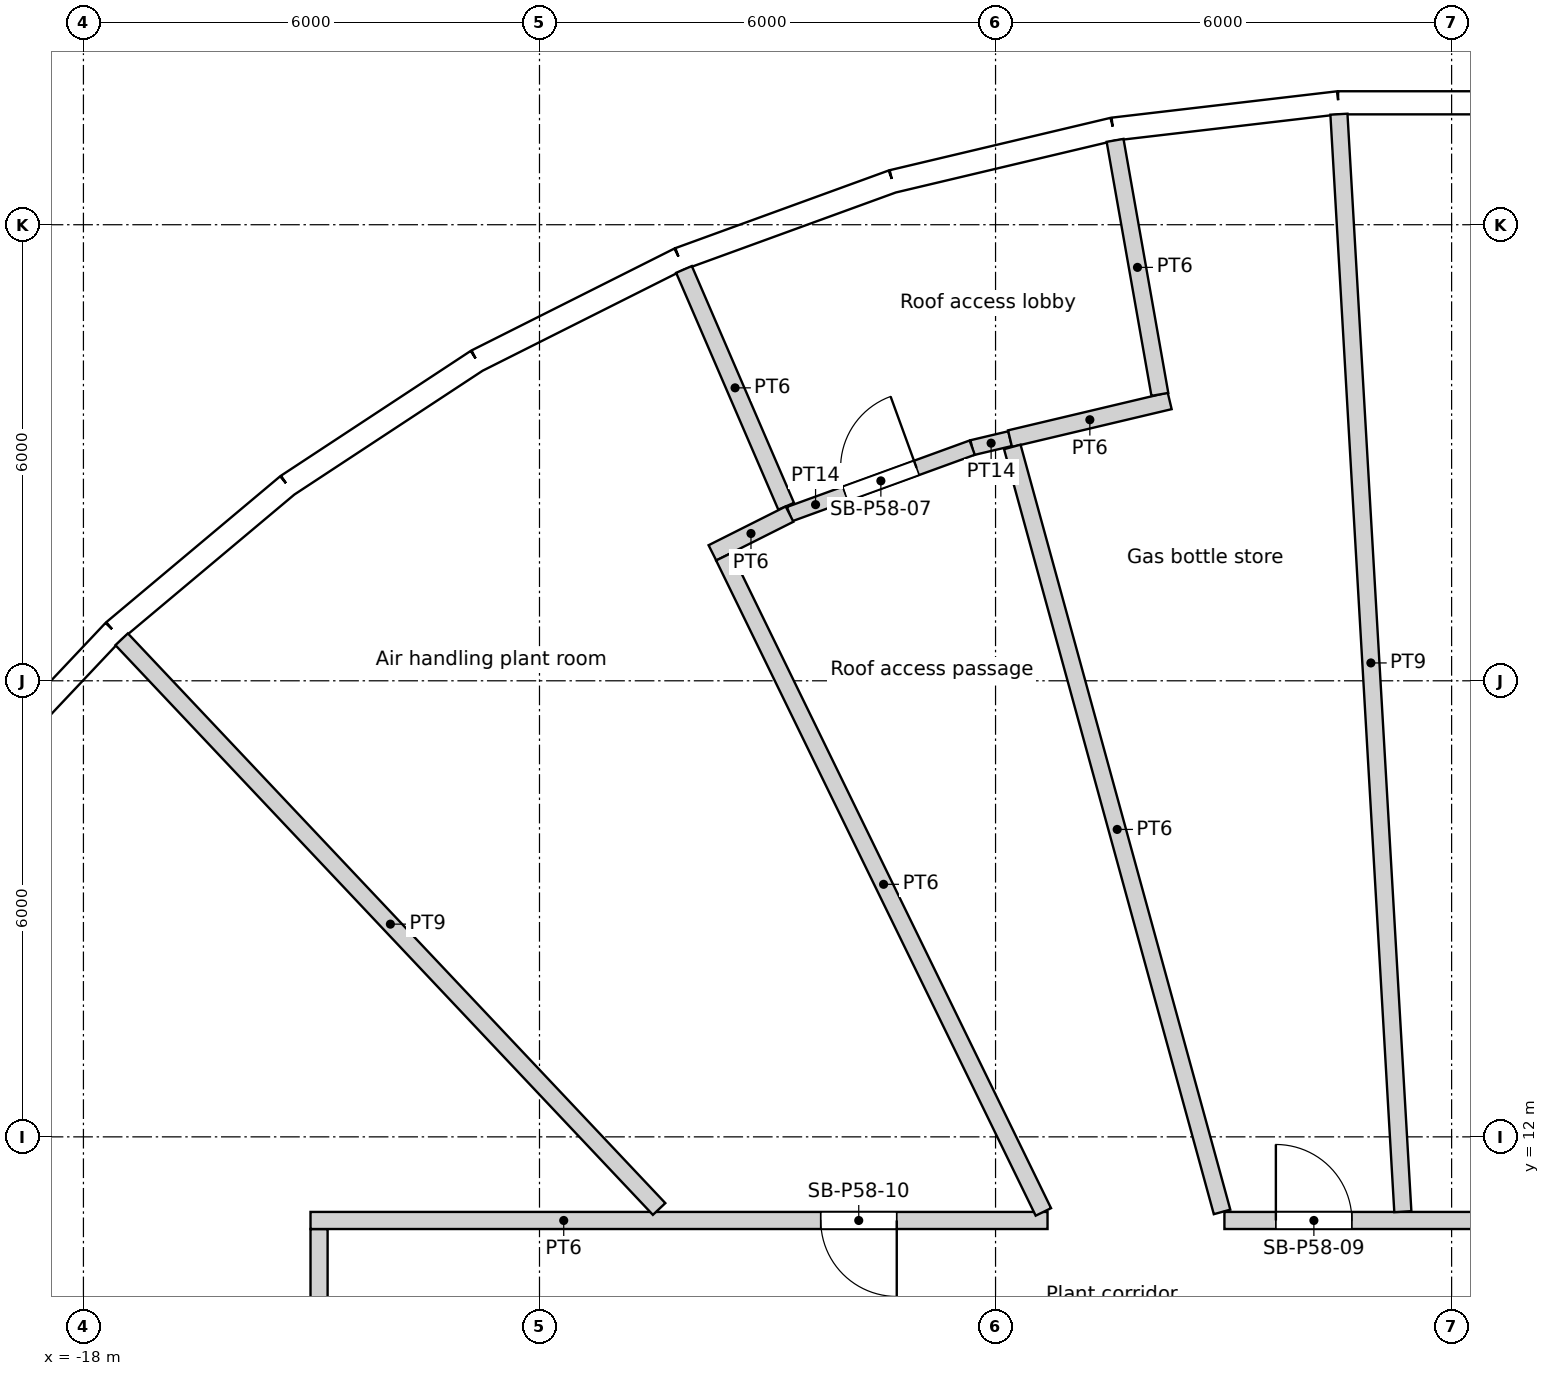
"""IFC4 building model, lengths in metres.
Left out: names, types, materials, properties, quantities, classifications, styles, units other than length and angle.
Written with IfcOpenShell. Run it as: python <this file> out.ifc"""

import sys

from ifc_helpers import new_model, si_unit, direction, frame, frame_2d, origin, origin_2d, place, context, subcontext, project, spatial, rectangle, circle, extrude, element, fill, save


model = new_model("IFC4")
c1 = context("Model", 3, precision=1e-05, world=origin(), true_north=direction((0.0, 1.0)))
c2 = subcontext(c1, "Body", "Model", "MODEL_VIEW")
j1 = project(units=[si_unit("LENGTHUNIT", "METRE"), si_unit("PLANEANGLEUNIT", "RADIAN")], contexts=[c1])
p1 = place(None, origin())
s1 = spatial("IfcSite", under=j1, at=p1, CompositionType="ELEMENT")
p2 = place(p1, origin())
s2 = spatial("IfcBuilding", under=s1, at=p2, CompositionType="ELEMENT")
p3 = place(p2, frame((0.0, 0.0, 225.0)))
s3 = spatial("IfcBuildingStorey", under=s2, at=p3, CompositionType="ELEMENT", Elevation=225.0)
for number, where, z_axis, x_axis in (
    (1, (-1.427, 24.506, 0.0), (0.0, 0.0, 1.0), (1.0, 0.0, 0.0)),
    (2, (-7.04, 23.516, 0.0), (0.0, 0.0, 1.0), (1.0, 0.0, 0.0)),
    (3, (-12.274, 21.259, 0.0), (0.0, 0.0, 1.0), (1.0, 0.0, 0.0)),
    (4, (-16.846, 17.855, 0.0), (0.0, 0.0, 1.0), (1.0, 0.0, 0.0)),
):
    element("IfcColumn", number, at=place(p3, frame(where, z_axis=z_axis, x_axis=x_axis)), inside=s3, PredefinedType="COLUMN", context=c2, shape_type="SweptSolid", body=[
        extrude(circle(Radius=0.6, at=origin_2d()), origin(), (0.0, 0.0, 1.0), 6.0),
    ])
for number, where, z_axis, x_axis in (
    (5, (-4.188, 18.35, 0.0), (0.0, 0.0, 1.0), (1.0, 0.0, 0.0)),
    (6, (-9.411, 16.301, 0.0), (0.0, 0.0, 1.0), (1.0, 0.0, 0.0)),
    (7, (-13.798, 12.802, 0.0), (0.0, 0.0, 1.0), (1.0, 0.0, 0.0)),
):
    element("IfcColumn", number, at=place(p3, frame(where, z_axis=z_axis, x_axis=x_axis)), inside=s3, PredefinedType="COLUMN", context=c2, shape_type="SweptSolid", body=[
        extrude(circle(Radius=0.65, at=origin_2d()), origin(), (0.0, 0.0, 1.0), 6.0),
    ])
p4 = place(p3, frame((1.491, 25.604, 0.0), z_axis=(0.0, 0.0, 1.0), x_axis=(-1.0, 0.0, 0.0)))
e8 = element("IfcWall", 8, at=p4, inside=s3, PredefinedType="SOLIDWALL", context=c2, shape_type="SweptSolid", body=[
    extrude(rectangle(XDim=2.982, YDim=0.3, at=frame_2d((1.491, 0.0))), origin(), (0.0, 0.0, 1.0), 5.65),
])
p5 = place(p4, frame((1.491, 0.0, 1.825)))
e9 = element("IfcOpeningElement", 9, at=p5, cuts=e8, PredefinedType="OPENING", context=c2, shape_type="SweptSolid", body=[
    extrude(circle(Radius=1.2, at=origin_2d()), frame((0.0, 0.16, 0.0), z_axis=(0.0, -1.0, 0.0), x_axis=(1.0, 0.0, 0.0)), (0.0, 0.0, 1.0), 0.32),
])
p6 = place(p3, frame((-1.491, 25.604, 0.0), z_axis=(0.0, 0.0, 1.0), x_axis=(-0.993240822844, -0.116071821888, 0.0)))
e10 = element("IfcWall", 10, at=p6, inside=s3, PredefinedType="SOLIDWALL", context=c2, shape_type="SweptSolid", body=[
    extrude(rectangle(XDim=2.983, YDim=0.3, at=frame_2d((1.491, 0.0))), origin(), (0.0, 0.0, 1.0), 5.65),
])
p7 = place(p6, frame((1.491, 0.0, 1.825)))
e11 = element("IfcOpeningElement", 11, at=p7, cuts=e10, PredefinedType="OPENING", context=c2, shape_type="SweptSolid", body=[
    extrude(circle(Radius=1.2, at=origin_2d()), frame((0.0, 0.16, 0.0), z_axis=(0.0, -1.0, 0.0), x_axis=(1.0, 0.0, 0.0)), (0.0, 0.0, 1.0), 0.32),
])
p8 = place(p3, frame((-4.454, 25.258, 0.0), z_axis=(0.0, 0.0, 1.0), x_axis=(-0.973049843813, -0.230594886012, 0.0)))
e12 = element("IfcWall", 12, at=p8, inside=s3, PredefinedType="SOLIDWALL", context=c2, shape_type="SweptSolid", body=[
    extrude(rectangle(XDim=2.982, YDim=0.3, at=frame_2d((1.491, 0.0))), origin(), (0.0, 0.0, 1.0), 5.65),
])
p9 = place(p8, frame((1.491, 0.0, 1.825)))
e13 = element("IfcOpeningElement", 13, at=p9, cuts=e12, PredefinedType="OPENING", context=c2, shape_type="SweptSolid", body=[
    extrude(circle(Radius=1.2, at=origin_2d()), frame((0.0, 0.16, 0.0), z_axis=(0.0, -1.0, 0.0), x_axis=(1.0, 0.0, 0.0)), (0.0, 0.0, 1.0), 0.32),
])
p10 = place(p3, frame((-7.356, 24.57, 0.0), z_axis=(0.0, 0.0, 1.0), x_axis=(-0.939676264274, -0.342065079129, 0.0)))
e14 = element("IfcWall", 14, at=p10, inside=s3, PredefinedType="SOLIDWALL", context=c2, shape_type="SweptSolid", body=[
    extrude(rectangle(XDim=2.983, YDim=0.3, at=frame_2d((1.491, 0.0))), origin(), (0.0, 0.0, 1.0), 5.65),
])
p11 = place(p10, frame((1.491, 0.0, 1.825)))
e15 = element("IfcOpeningElement", 15, at=p11, cuts=e14, PredefinedType="OPENING", context=c2, shape_type="SweptSolid", body=[
    extrude(circle(Radius=1.2, at=origin_2d()), frame((0.0, 0.16, 0.0), z_axis=(0.0, -1.0, 0.0), x_axis=(1.0, 0.0, 0.0)), (0.0, 0.0, 1.0), 0.32),
])
p12 = place(p3, frame((-10.158, 23.55, 0.0), z_axis=(0.0, 0.0, 1.0), x_axis=(-0.893656390984, -0.448751885626, 0.0)))
e16 = element("IfcWall", 16, at=p12, inside=s3, PredefinedType="SOLIDWALL", context=c2, shape_type="SweptSolid", body=[
    extrude(rectangle(XDim=2.982, YDim=0.3, at=frame_2d((1.491, 0.0))), origin(), (0.0, 0.0, 1.0), 5.65),
])
p13 = place(p12, frame((1.491, 0.0, 1.825)))
e17 = element("IfcOpeningElement", 17, at=p13, cuts=e16, PredefinedType="OPENING", context=c2, shape_type="SweptSolid", body=[
    extrude(circle(Radius=1.2, at=origin_2d()), frame((0.0, 0.16, 0.0), z_axis=(0.0, -1.0, 0.0), x_axis=(1.0, 0.0, 0.0)), (0.0, 0.0, 1.0), 0.32),
])
p14 = place(p3, frame((-12.824, 22.211, 0.0), z_axis=(0.0, 0.0, 1.0), x_axis=(-0.835497187922, -0.549494721517, 0.0)))
e18 = element("IfcWall", 18, at=p14, inside=s3, PredefinedType="SOLIDWALL", context=c2, shape_type="SweptSolid", body=[
    extrude(rectangle(XDim=2.983, YDim=0.3, at=frame_2d((1.491, 0.0))), origin(), (0.0, 0.0, 1.0), 5.65),
])
p15 = place(p14, frame((1.491, 0.0, 1.825)))
e19 = element("IfcOpeningElement", 19, at=p15, cuts=e18, PredefinedType="OPENING", context=c2, shape_type="SweptSolid", body=[
    extrude(circle(Radius=1.2, at=origin_2d()), frame((0.0, 0.16, 0.0), z_axis=(0.0, -1.0, 0.0), x_axis=(1.0, 0.0, 0.0)), (0.0, 0.0, 1.0), 0.32),
])
p16 = place(p3, frame((-15.316, 20.573, 0.0), z_axis=(0.0, 0.0, 1.0), x_axis=(-0.766015999952, -0.64282150541, 0.0)))
e20 = element("IfcWall", 20, at=p16, inside=s3, PredefinedType="SOLIDWALL", context=c2, shape_type="SweptSolid", body=[
    extrude(rectangle(XDim=2.982, YDim=0.3, at=frame_2d((1.491, 0.0))), origin(), (0.0, 0.0, 1.0), 5.65),
])
p17 = place(p16, frame((1.491, 0.0, 1.825)))
e21 = element("IfcOpeningElement", 21, at=p17, cuts=e20, PredefinedType="OPENING", context=c2, shape_type="SweptSolid", body=[
    extrude(circle(Radius=1.2, at=origin_2d()), frame((0.0, 0.16, 0.0), z_axis=(0.0, -1.0, 0.0), x_axis=(1.0, 0.0, 0.0)), (0.0, 0.0, 1.0), 0.32),
])
p18 = place(p3, frame((-17.6, 18.655, 0.0), z_axis=(0.0, 0.0, 1.0), x_axis=(-0.686219609698, -0.72739442345, 0.0)))
e22 = element("IfcWall", 22, at=p18, inside=s3, PredefinedType="SOLIDWALL", context=c2, shape_type="SweptSolid", body=[
    extrude(rectangle(XDim=2.982, YDim=0.3, at=frame_2d((1.491, 0.0))), origin(), (0.0, 0.0, 1.0), 5.65),
])
p19 = place(p18, frame((1.491, 0.0, 1.825)))
e23 = element("IfcOpeningElement", 23, at=p19, cuts=e22, PredefinedType="OPENING", context=c2, shape_type="SweptSolid", body=[
    extrude(circle(Radius=1.2, at=origin_2d()), frame((0.0, 0.16, 0.0), z_axis=(0.0, -1.0, 0.0), x_axis=(1.0, 0.0, 0.0)), (0.0, 0.0, 1.0), 0.32),
])
p20 = place(p3, frame((-17.497, 18.546, 0.0), z_axis=(0.0, 0.0, 1.0), x_axis=(0.686241478279, -0.727373792138, 0.0)))
e24 = element("IfcWall", 24, at=p20, inside=s3, PredefinedType="PARTITIONING", context=c2, shape_type="SweptSolid", body=[
    extrude(rectangle(XDim=10.304, YDim=0.225, at=frame_2d((5.152, 0.0))), origin(), (0.0, 0.0, 1.0), 2.7),
])
p21 = place(p3, frame((-14.9, 10.788, 0.0), z_axis=(0.0, 0.0, 1.0), x_axis=(0.0, -1.0, 0.0)))
e25 = element("IfcWall", 25, at=p21, inside=s3, PredefinedType="PARTITIONING", context=c2, shape_type="SweptSolid", body=[
    extrude(rectangle(XDim=21.8, YDim=0.225, at=frame_2d((10.9, 0.0))), origin(), (0.0, 0.0, 1.0), 5.2),
])
p22 = place(p21, frame((5.708, 0.0, 0.0)))
e26 = element("IfcOpeningElement", 26, at=p22, cuts=e25, PredefinedType="OPENING", context=c2, shape_type="SweptSolid", body=[
    extrude(rectangle(XDim=1.0, YDim=2.1, at=frame_2d((0.5, 1.05))), frame((0.0, 0.113, 0.0), z_axis=(0.0, -1.0, 0.0), x_axis=(1.0, 0.0, 0.0)), (0.0, 0.0, 1.0), 0.225),
])
p23 = place(p21, frame((16.608, 0.0, 0.0)))
e27 = element("IfcOpeningElement", 27, at=p23, cuts=e25, PredefinedType="OPENING", context=c2, shape_type="SweptSolid", body=[
    extrude(rectangle(XDim=1.0, YDim=2.1, at=frame_2d((0.5, 1.05))), frame((0.0, 0.113, 0.0), z_axis=(0.0, -1.0, 0.0), x_axis=(1.0, 0.0, 0.0)), (0.0, 0.0, 1.0), 0.225),
])
p24 = place(p3, frame((-10.099, 23.412, 0.0), z_axis=(0.0, 0.0, 1.0), x_axis=(0.396080406485, -0.918215830619, 0.0)))
e28 = element("IfcWall", 28, at=p24, inside=s3, PredefinedType="PARTITIONING", context=c2, shape_type="SweptSolid", body=[
    extrude(rectangle(XDim=3.393, YDim=0.225, at=frame_2d((1.697, 0.0))), origin(), (0.0, 0.0, 1.0), 5.2),
])
p25 = place(p3, frame((-9.575, 19.633, 0.0), z_axis=(0.0, 0.0, 1.0), x_axis=(0.438353415496, -0.898802694212, 0.0)))
e29 = element("IfcWall", 29, at=p25, inside=s3, PredefinedType="PARTITIONING", context=c2, shape_type="SweptSolid", body=[
    extrude(rectangle(XDim=9.591, YDim=0.225, at=frame_2d((4.795, 0.0))), origin(), (0.0, 0.0, 1.0), 5.2),
])
p26 = place(p3, frame((-8.71, 20.193, 0.0), z_axis=(0.0, 0.0, 1.0), x_axis=(-0.893651754286, -0.448761119152, 0.0)))
e30 = element("IfcWall", 30, at=p26, inside=s3, PredefinedType="PARTITIONING", context=c2, shape_type="SweptSolid", body=[
    extrude(rectangle(XDim=1.135, YDim=0.225, at=frame_2d((0.568, 0.0))), origin(), (0.0, 0.0, 1.0), 5.2),
])
p27 = place(p3, frame((-8.71, 20.193, 0.0), z_axis=(0.0, 0.0, 1.0), x_axis=(0.939679089592, 0.342057317688, 0.0)))
e31 = element("IfcWall", 31, at=p27, inside=s3, PredefinedType="PARTITIONING", context=c2, shape_type="SweptSolid", body=[
    extrude(rectangle(XDim=2.557, YDim=0.2, at=frame_2d((1.279, 0.0))), origin(), (0.0, 0.0, 1.0), 5.2),
])
p28 = place(p27, frame((0.779, 0.0, 0.0)))
e32 = element("IfcOpeningElement", 32, at=p28, cuts=e31, PredefinedType="OPENING", context=c2, shape_type="SweptSolid", body=[
    extrude(rectangle(XDim=1.0, YDim=2.1, at=frame_2d((0.5, 1.05))), frame((0.0, 0.1, 0.0), z_axis=(0.0, -1.0, 0.0), x_axis=(1.0, 0.0, 0.0)), (0.0, 0.0, 1.0), 0.2),
])
p29 = place(p3, frame((-5.81, 21.185, 0.0), z_axis=(0.0, 0.0, 1.0), x_axis=(-0.973046464048, -0.230609147269, 0.0)))
e33 = element("IfcWall", 33, at=p29, inside=s3, PredefinedType="PARTITIONING", context=c2, shape_type="SweptSolid", body=[
    extrude(rectangle(XDim=0.511, YDim=0.2, at=frame_2d((0.256, 0.0))), origin(), (0.0, 0.0, 1.0), 5.2),
])
p30 = place(p3, frame((-5.78, 21.077, 0.0), z_axis=(0.0, 0.0, 1.0), x_axis=(0.264447382595, -0.964400115014, 0.0)))
e34 = element("IfcWall", 34, at=p30, inside=s3, PredefinedType="PARTITIONING", context=c2, shape_type="SweptSolid", body=[
    extrude(rectangle(XDim=10.436, YDim=0.225, at=frame_2d((5.218, 0.0))), origin(), (0.0, 0.0, 1.0), 5.2),
])
p31 = place(p3, frame((-5.316, 10.9, 0.0), z_axis=(0.0, 0.0, 1.0), x_axis=(-1.0, 0.0, 0.0)))
e35 = element("IfcWall", 35, at=p31, inside=s3, PredefinedType="PARTITIONING", context=c2, shape_type="SweptSolid", body=[
    extrude(rectangle(XDim=9.696, YDim=0.225, at=frame_2d((4.848, 0.0))), origin(), (0.0, 0.0, 1.0), 5.2),
])
p32 = place(p31, frame((1.984, 0.0, 0.0)))
e36 = element("IfcOpeningElement", 36, at=p32, cuts=e35, PredefinedType="OPENING", context=c2, shape_type="SweptSolid", body=[
    extrude(rectangle(XDim=1.0, YDim=2.1, at=frame_2d((0.5, 1.05))), frame((0.0, 0.113, 0.0), z_axis=(0.0, -1.0, 0.0), x_axis=(1.0, 0.0, 0.0)), (0.0, 0.0, 1.0), 0.225),
])
p33 = place(p3, frame((-4.427, 25.11, 0.0), z_axis=(0.0, 0.0, 1.0), x_axis=(0.173678620436, -0.984802384645, 0.0)))
e37 = element("IfcWall", 37, at=p33, inside=s3, PredefinedType="PARTITIONING", context=c2, shape_type="SweptSolid", body=[
    extrude(rectangle(XDim=3.393, YDim=0.225, at=frame_2d((1.697, 0.0))), origin(), (0.0, 0.0, 1.0), 5.2),
])
p34 = place(p3, frame((-3.709, 21.683, 0.0), z_axis=(0.0, 0.0, 1.0), x_axis=(-0.973043562326, -0.230621390629, 0.0)))
e38 = element("IfcWall", 38, at=p34, inside=s3, PredefinedType="PARTITIONING", context=c2, shape_type="SweptSolid", body=[
    extrude(rectangle(XDim=2.158, YDim=0.225, at=frame_2d((1.079, 0.0))), origin(), (0.0, 0.0, 1.0), 5.2),
])
p35 = place(p3, frame((-1.482, 25.454, 0.0), z_axis=(0.0, 0.0, 1.0), x_axis=(0.058137182414, -0.9983086036, 0.0)))
e39 = element("IfcWall", 39, at=p35, inside=s3, PredefinedType="PARTITIONING", context=c2, shape_type="SweptSolid", body=[
    extrude(rectangle(XDim=14.463, YDim=0.225, at=frame_2d((7.231, 0.0))), origin(), (0.0, 0.0, 1.0), 2.7),
])
p36 = place(p3, frame((13.239, 10.9, 0.0), z_axis=(0.0, 0.0, 1.0), x_axis=(-1.0, 0.0, 0.0)))
e40 = element("IfcWall", 40, at=p36, inside=s3, PredefinedType="PARTITIONING", context=c2, shape_type="SweptSolid", body=[
    extrude(rectangle(XDim=16.228, YDim=0.225, at=frame_2d((8.114, 0.0))), origin(), (0.0, 0.0, 1.0), 5.2),
])
p37 = place(p36, frame((3.738, 0.0, 0.0)))
e41 = element("IfcOpeningElement", 41, at=p37, cuts=e40, PredefinedType="OPENING", context=c2, shape_type="SweptSolid", body=[
    extrude(rectangle(XDim=1.8, YDim=2.4, at=frame_2d((0.9, 1.2))), frame((0.0, 0.113, 0.0), z_axis=(0.0, -1.0, 0.0), x_axis=(1.0, 0.0, 0.0)), (0.0, 0.0, 1.0), 0.225),
])
p38 = place(p36, frame((10.706, 0.0, 0.0)))
e42 = element("IfcOpeningElement", 42, at=p38, cuts=e40, PredefinedType="OPENING", context=c2, shape_type="SweptSolid", body=[
    extrude(rectangle(XDim=1.0, YDim=2.1, at=frame_2d((0.5, 1.05))), frame((0.0, 0.113, 0.0), z_axis=(0.0, -1.0, 0.0), x_axis=(1.0, 0.0, 0.0)), (0.0, 0.0, 1.0), 0.225),
])
p39 = place(p36, frame((14.551, 0.0, 0.0)))
e43 = element("IfcOpeningElement", 43, at=p39, cuts=e40, PredefinedType="OPENING", context=c2, shape_type="SweptSolid", body=[
    extrude(rectangle(XDim=1.0, YDim=2.1, at=frame_2d((0.5, 1.05))), frame((0.0, 0.113, 0.0), z_axis=(0.0, -1.0, 0.0), x_axis=(1.0, 0.0, 0.0)), (0.0, 0.0, 1.0), 0.225),
])
p40 = place(p5, origin())
e44 = element("IfcWindow", 44, at=p40, inside=s3, PartitioningType="SINGLE_PANEL", PredefinedType="WINDOW", context=c2, shape_type="SweptSolid", body=[
    extrude(circle(Radius=1.2, at=origin_2d()), frame((0.0, 0.12, 0.0), z_axis=(0.0, -1.0, 0.0), x_axis=(1.0, 0.0, 0.0)), (0.0, 0.0, 1.0), 0.1),
])
fill(e9, e44)
p41 = place(p7, origin())
e45 = element("IfcWindow", 45, at=p41, inside=s3, PartitioningType="SINGLE_PANEL", PredefinedType="WINDOW", context=c2, shape_type="SweptSolid", body=[
    extrude(circle(Radius=1.2, at=origin_2d()), frame((0.0, 0.12, 0.0), z_axis=(0.0, -1.0, 0.0), x_axis=(1.0, 0.0, 0.0)), (0.0, 0.0, 1.0), 0.1),
])
fill(e11, e45)
p42 = place(p9, origin())
e46 = element("IfcWindow", 46, at=p42, inside=s3, PartitioningType="SINGLE_PANEL", PredefinedType="WINDOW", context=c2, shape_type="SweptSolid", body=[
    extrude(circle(Radius=1.2, at=origin_2d()), frame((0.0, 0.12, 0.0), z_axis=(0.0, -1.0, 0.0), x_axis=(1.0, 0.0, 0.0)), (0.0, 0.0, 1.0), 0.1),
])
fill(e13, e46)
p43 = place(p11, origin())
e47 = element("IfcWindow", 47, at=p43, inside=s3, PartitioningType="SINGLE_PANEL", PredefinedType="WINDOW", context=c2, shape_type="SweptSolid", body=[
    extrude(circle(Radius=1.2, at=origin_2d()), frame((0.0, 0.12, 0.0), z_axis=(0.0, -1.0, 0.0), x_axis=(1.0, 0.0, 0.0)), (0.0, 0.0, 1.0), 0.1),
])
fill(e15, e47)
p44 = place(p13, origin())
e48 = element("IfcWindow", 48, at=p44, inside=s3, PartitioningType="SINGLE_PANEL", PredefinedType="WINDOW", context=c2, shape_type="SweptSolid", body=[
    extrude(circle(Radius=1.2, at=origin_2d()), frame((0.0, 0.12, 0.0), z_axis=(0.0, -1.0, 0.0), x_axis=(1.0, 0.0, 0.0)), (0.0, 0.0, 1.0), 0.1),
])
fill(e17, e48)
p45 = place(p15, origin())
e49 = element("IfcWindow", 49, at=p45, inside=s3, PartitioningType="SINGLE_PANEL", PredefinedType="WINDOW", context=c2, shape_type="SweptSolid", body=[
    extrude(circle(Radius=1.2, at=origin_2d()), frame((0.0, 0.12, 0.0), z_axis=(0.0, -1.0, 0.0), x_axis=(1.0, 0.0, 0.0)), (0.0, 0.0, 1.0), 0.1),
])
fill(e19, e49)
p46 = place(p17, origin())
e50 = element("IfcWindow", 50, at=p46, inside=s3, PartitioningType="SINGLE_PANEL", PredefinedType="WINDOW", context=c2, shape_type="SweptSolid", body=[
    extrude(circle(Radius=1.2, at=origin_2d()), frame((0.0, 0.12, 0.0), z_axis=(0.0, -1.0, 0.0), x_axis=(1.0, 0.0, 0.0)), (0.0, 0.0, 1.0), 0.1),
])
fill(e21, e50)
p47 = place(p19, origin())
e51 = element("IfcWindow", 51, at=p47, inside=s3, PartitioningType="SINGLE_PANEL", PredefinedType="WINDOW", context=c2, shape_type="SweptSolid", body=[
    extrude(circle(Radius=1.2, at=origin_2d()), frame((0.0, 0.12, 0.0), z_axis=(0.0, -1.0, 0.0), x_axis=(1.0, 0.0, 0.0)), (0.0, 0.0, 1.0), 0.1),
])
fill(e23, e51)
p48 = place(p28, origin())
e52 = element("IfcDoor", 52, at=p48, inside=s3, OperationType="SINGLE_SWING_RIGHT", PredefinedType="DOOR", context=c2, shape_type="SweptSolid", body=[
    extrude(rectangle(XDim=1.0, YDim=2.1, at=frame_2d((0.5, 1.05))), frame((0.0, 0.025, 0.0), z_axis=(0.0, -1.0, 0.0), x_axis=(1.0, 0.0, 0.0)), (0.0, 0.0, 1.0), 0.05),
])
fill(e32, e52)
p49 = place(p39, origin())
e53 = element("IfcDoor", 53, at=p49, inside=s3, OperationType="SINGLE_SWING_LEFT", PredefinedType="DOOR", context=c2, shape_type="SweptSolid", body=[
    extrude(rectangle(XDim=1.0, YDim=2.1, at=frame_2d((0.5, 1.05))), frame((0.0, 0.025, 0.0), z_axis=(0.0, -1.0, 0.0), x_axis=(1.0, 0.0, 0.0)), (0.0, 0.0, 1.0), 0.05),
])
fill(e43, e53)
p50 = place(p32, origin())
e54 = element("IfcDoor", 54, at=p50, inside=s3, OperationType="SINGLE_SWING_LEFT", PredefinedType="DOOR", context=c2, shape_type="SweptSolid", body=[
    extrude(rectangle(XDim=1.0, YDim=2.1, at=frame_2d((0.5, 1.05))), frame((0.0, 0.025, 0.0), z_axis=(0.0, -1.0, 0.0), x_axis=(1.0, 0.0, 0.0)), (0.0, 0.0, 1.0), 0.05),
])
fill(e36, e54)
save(model, sys.argv[1])
